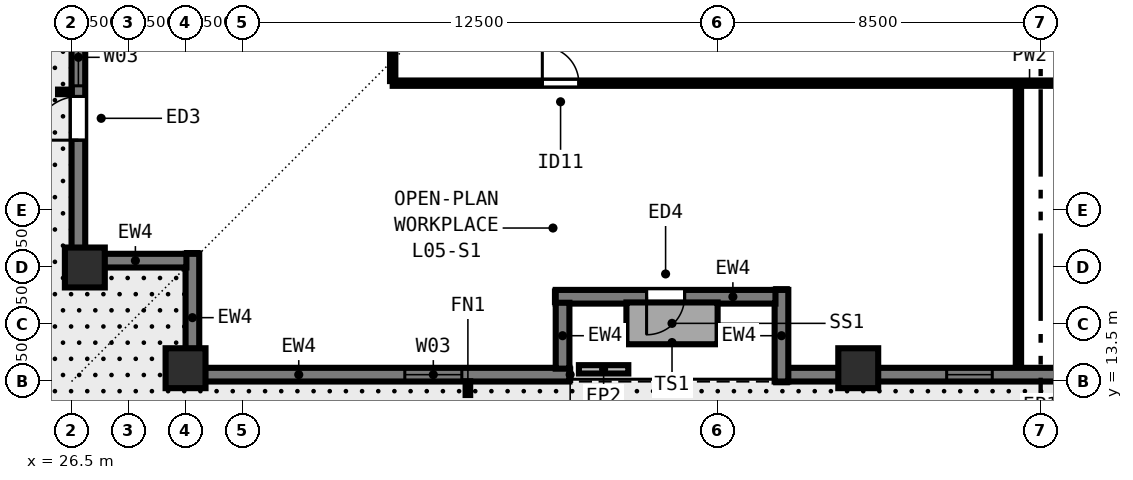
"""IFC4 building model, lengths in metres.
Left out: names, types, materials, properties, quantities, classifications, styles, units other than length and angle.
Written with IfcOpenShell. Run it as: python <this file> out.ifc"""

import sys

from ifc_helpers import new_model, si_unit, direction, frame, frame_2d, origin, origin_2d, place, context, subcontext, project, spatial, rectangle, extrude, element, fill, save


model = new_model("IFC4")
c1 = context("Model", 3, precision=1e-05, world=origin(), true_north=direction((0.0, 1.0)))
c2 = subcontext(c1, "Body", "Model", "MODEL_VIEW")
j1 = project(units=[si_unit("LENGTHUNIT", "METRE"), si_unit("PLANEANGLEUNIT", "RADIAN")], contexts=[c1])
p1 = place(None, origin())
s1 = spatial("IfcSite", under=j1, at=p1, CompositionType="ELEMENT")
p2 = place(p1, origin())
s2 = spatial("IfcBuilding", under=s1, at=p2, CompositionType="ELEMENT")
p3 = place(p2, frame((0.0, 0.0, 23.5)))
s3 = spatial("IfcBuildingStorey", under=s2, at=p3, CompositionType="ELEMENT", Elevation=23.5)
for number, where, z_axis, x_axis in (
    (1, (29.5, 13.85, 0.0), (0.0, 0.0, 1.0), (1.0, 0.0, 0.0)),
    (2, (47.2, 13.85, 0.0), (0.0, 0.0, 1.0), (1.0, 0.0, 0.0)),
    (3, (26.85, 16.5, 0.0), (0.0, 0.0, 1.0), (0.0, 1.0, 0.0)),
):
    element("IfcColumn", number, at=place(p3, frame(where, z_axis=z_axis, x_axis=x_axis)), inside=s3, PredefinedType="COLUMN", context=c2, shape_type="SweptSolid", body=[
        extrude(rectangle(XDim=1.05, YDim=1.05, at=origin_2d()), origin(), (0.0, 0.0, 1.0), 3.5),
    ])
p4 = place(p3, frame((39.6, 13.68, 0.0), z_axis=(0.0, 0.0, 1.0), x_axis=(-1.0, 0.0, 0.0)))
e4 = element("IfcWall", 4, at=p4, inside=s3, PredefinedType="SOLIDWALL", context=c2, shape_type="SweptSolid", body=[
    extrude(rectangle(XDim=9.762, YDim=0.36, at=frame_2d((4.881, 0.0))), origin(), (0.0, 0.0, 1.0), 3.28),
])
p5 = place(p4, frame((2.831, 0.0, 0.8)))
e5 = element("IfcOpeningElement", 5, at=p5, cuts=e4, PredefinedType="OPENING", context=c2, shape_type="SweptSolid", body=[
    extrude(rectangle(XDim=1.5, YDim=1.544, at=frame_2d((0.75, 0.772))), frame((0.0, 0.19, 0.0), z_axis=(0.0, -1.0, 0.0), x_axis=(1.0, 0.0, 0.0)), (0.0, 0.0, 1.0), 0.38),
])
p6 = place(p3, frame((29.68, 13.5, 0.0), z_axis=(0.0, 0.0, 1.0), x_axis=(0.0, 1.0, 0.0)))
e6 = element("IfcWall", 6, at=p6, inside=s3, PredefinedType="SOLIDWALL", context=c2, shape_type="SweptSolid", body=[
    extrude(rectangle(XDim=3.36, YDim=0.36, at=frame_2d((1.68, 0.0))), origin(), (0.0, 0.0, 1.0), 3.28),
])
p7 = place(p3, frame((29.522, 16.68, 0.0), z_axis=(0.0, 0.0, 1.0), x_axis=(-1.0, 0.0, 0.0)))
e7 = element("IfcWall", 7, at=p7, inside=s3, PredefinedType="SOLIDWALL", context=c2, shape_type="SweptSolid", body=[
    extrude(rectangle(XDim=2.684, YDim=0.36, at=frame_2d((1.342, 0.0))), origin(), (0.0, 0.0, 1.0), 3.28),
])
p8 = place(p3, frame((26.68, 16.5, 0.0), z_axis=(0.0, 0.0, 1.0), x_axis=(0.0, 1.0, 0.0)))
e8 = element("IfcWall", 8, at=p8, inside=s3, PredefinedType="SOLIDWALL", context=c2, shape_type="SweptSolid", body=[
    extrude(rectangle(XDim=44.662, YDim=0.36, at=frame_2d((22.331, 0.0))), origin(), (0.0, 0.0, 1.0), 3.28),
])
p9 = place(p8, frame((4.78, 0.0, 0.8)))
e9 = element("IfcOpeningElement", 9, at=p9, cuts=e8, PredefinedType="OPENING", context=c2, shape_type="SweptSolid", body=[
    extrude(rectangle(XDim=1.5, YDim=1.544, at=frame_2d((0.75, 0.772))), frame((0.0, 0.19, 0.0), z_axis=(0.0, -1.0, 0.0), x_axis=(1.0, 0.0, 0.0)), (0.0, 0.0, 1.0), 0.38),
])
p10 = place(p8, frame((8.29, 0.0, 0.8)))
e10 = element("IfcOpeningElement", 10, at=p10, cuts=e8, PredefinedType="OPENING", context=c2, shape_type="SweptSolid", body=[
    extrude(rectangle(XDim=1.2, YDim=1.544, at=frame_2d((0.6, 0.772))), frame((0.0, 0.19, 0.0), z_axis=(0.0, -1.0, 0.0), x_axis=(1.0, 0.0, 0.0)), (0.0, 0.0, 1.0), 0.38),
])
p11 = place(p8, frame((11.5, 0.0, 0.8)))
e11 = element("IfcOpeningElement", 11, at=p11, cuts=e8, PredefinedType="OPENING", context=c2, shape_type="SweptSolid", body=[
    extrude(rectangle(XDim=1.5, YDim=1.544, at=frame_2d((0.75, 0.772))), frame((0.0, 0.19, 0.0), z_axis=(0.0, -1.0, 0.0), x_axis=(1.0, 0.0, 0.0)), (0.0, 0.0, 1.0), 0.38),
])
p12 = place(p8, frame((14.561, 0.0, 0.8)))
e12 = element("IfcOpeningElement", 12, at=p12, cuts=e8, PredefinedType="OPENING", context=c2, shape_type="SweptSolid", body=[
    extrude(rectangle(XDim=1.2, YDim=1.544, at=frame_2d((0.6, 0.772))), frame((0.0, 0.19, 0.0), z_axis=(0.0, -1.0, 0.0), x_axis=(1.0, 0.0, 0.0)), (0.0, 0.0, 1.0), 0.38),
])
p13 = place(p8, frame((18.671, 0.0, 0.8)))
e13 = element("IfcOpeningElement", 13, at=p13, cuts=e8, PredefinedType="OPENING", context=c2, shape_type="SweptSolid", body=[
    extrude(rectangle(XDim=1.5, YDim=1.544, at=frame_2d((0.75, 0.772))), frame((0.0, 0.19, 0.0), z_axis=(0.0, -1.0, 0.0), x_axis=(1.0, 0.0, 0.0)), (0.0, 0.0, 1.0), 0.38),
])
p14 = place(p8, frame((21.731, 0.0, 0.8)))
e14 = element("IfcOpeningElement", 14, at=p14, cuts=e8, PredefinedType="OPENING", context=c2, shape_type="SweptSolid", body=[
    extrude(rectangle(XDim=1.2, YDim=1.544, at=frame_2d((0.6, 0.772))), frame((0.0, 0.19, 0.0), z_axis=(0.0, -1.0, 0.0), x_axis=(1.0, 0.0, 0.0)), (0.0, 0.0, 1.0), 0.38),
])
p15 = place(p8, frame((24.941, 0.0, 0.8)))
e15 = element("IfcOpeningElement", 15, at=p15, cuts=e8, PredefinedType="OPENING", context=c2, shape_type="SweptSolid", body=[
    extrude(rectangle(XDim=1.5, YDim=1.544, at=frame_2d((0.75, 0.772))), frame((0.0, 0.19, 0.0), z_axis=(0.0, -1.0, 0.0), x_axis=(1.0, 0.0, 0.0)), (0.0, 0.0, 1.0), 0.38),
])
p16 = place(p8, frame((29.302, 0.0, 0.8)))
e16 = element("IfcOpeningElement", 16, at=p16, cuts=e8, PredefinedType="OPENING", context=c2, shape_type="SweptSolid", body=[
    extrude(rectangle(XDim=1.2, YDim=1.544, at=frame_2d((0.6, 0.772))), frame((0.0, 0.19, 0.0), z_axis=(0.0, -1.0, 0.0), x_axis=(1.0, 0.0, 0.0)), (0.0, 0.0, 1.0), 0.38),
])
p17 = place(p8, frame((31.662, 0.0, 0.8)))
e17 = element("IfcOpeningElement", 17, at=p17, cuts=e8, PredefinedType="OPENING", context=c2, shape_type="SweptSolid", body=[
    extrude(rectangle(XDim=1.5, YDim=1.544, at=frame_2d((0.75, 0.772))), frame((0.0, 0.19, 0.0), z_axis=(0.0, -1.0, 0.0), x_axis=(1.0, 0.0, 0.0)), (0.0, 0.0, 1.0), 0.38),
])
p18 = place(p8, frame((35.172, 0.0, 0.8)))
e18 = element("IfcOpeningElement", 18, at=p18, cuts=e8, PredefinedType="OPENING", context=c2, shape_type="SweptSolid", body=[
    extrude(rectangle(XDim=1.2, YDim=1.544, at=frame_2d((0.6, 0.772))), frame((0.0, 0.19, 0.0), z_axis=(0.0, -1.0, 0.0), x_axis=(1.0, 0.0, 0.0)), (0.0, 0.0, 1.0), 0.38),
])
p19 = place(p8, frame((38.382, 0.0, 0.8)))
e19 = element("IfcOpeningElement", 19, at=p19, cuts=e8, PredefinedType="OPENING", context=c2, shape_type="SweptSolid", body=[
    extrude(rectangle(XDim=1.5, YDim=1.544, at=frame_2d((0.75, 0.772))), frame((0.0, 0.19, 0.0), z_axis=(0.0, -1.0, 0.0), x_axis=(1.0, 0.0, 0.0)), (0.0, 0.0, 1.0), 0.38),
])
p20 = place(p8, frame((3.35, 0.0, 0.0)))
e20 = element("IfcOpeningElement", 20, at=p20, cuts=e8, PredefinedType="OPENING", context=c2, shape_type="SweptSolid", body=[
    extrude(rectangle(XDim=1.15, YDim=2.15, at=frame_2d((0.575, 1.075))), frame((0.0, 0.19, 0.0), z_axis=(0.0, -1.0, 0.0), x_axis=(1.0, 0.0, 0.0)), (0.0, 0.0, 1.0), 0.38),
])
p21 = place(p3, frame((74.5, 13.68, 0.0), z_axis=(0.0, 0.0, 1.0), x_axis=(-1.0, 0.0, 0.0)))
e21 = element("IfcWall", 21, at=p21, inside=s3, PredefinedType="SOLIDWALL", context=c2, shape_type="SweptSolid", body=[
    extrude(rectangle(XDim=29.162, YDim=0.36, at=frame_2d((14.581, 0.0))), origin(), (0.0, 0.0, 1.0), 3.28),
])
p22 = place(p21, frame((4.888, 0.0, 0.8)))
e22 = element("IfcOpeningElement", 22, at=p22, cuts=e21, PredefinedType="OPENING", context=c2, shape_type="SweptSolid", body=[
    extrude(rectangle(XDim=1.5, YDim=1.544, at=frame_2d((0.75, 0.772))), frame((0.0, 0.19, 0.0), z_axis=(0.0, -1.0, 0.0), x_axis=(1.0, 0.0, 0.0)), (0.0, 0.0, 1.0), 0.38),
])
p23 = place(p21, frame((8.615, 0.0, 0.8)))
e23 = element("IfcOpeningElement", 23, at=p23, cuts=e21, PredefinedType="OPENING", context=c2, shape_type="SweptSolid", body=[
    extrude(rectangle(XDim=1.2, YDim=1.544, at=frame_2d((0.6, 0.772))), frame((0.0, 0.19, 0.0), z_axis=(0.0, -1.0, 0.0), x_axis=(1.0, 0.0, 0.0)), (0.0, 0.0, 1.0), 0.38),
])
p24 = place(p21, frame((12.042, 0.0, 0.8)))
e24 = element("IfcOpeningElement", 24, at=p24, cuts=e21, PredefinedType="OPENING", context=c2, shape_type="SweptSolid", body=[
    extrude(rectangle(XDim=1.5, YDim=1.544, at=frame_2d((0.75, 0.772))), frame((0.0, 0.19, 0.0), z_axis=(0.0, -1.0, 0.0), x_axis=(1.0, 0.0, 0.0)), (0.0, 0.0, 1.0), 0.38),
])
p25 = place(p21, frame((15.32, 0.0, 0.8)))
e25 = element("IfcOpeningElement", 25, at=p25, cuts=e21, PredefinedType="OPENING", context=c2, shape_type="SweptSolid", body=[
    extrude(rectangle(XDim=1.2, YDim=1.544, at=frame_2d((0.6, 0.772))), frame((0.0, 0.19, 0.0), z_axis=(0.0, -1.0, 0.0), x_axis=(1.0, 0.0, 0.0)), (0.0, 0.0, 1.0), 0.38),
])
p26 = place(p21, frame((19.197, 0.0, 0.8)))
e26 = element("IfcOpeningElement", 26, at=p26, cuts=e21, PredefinedType="OPENING", context=c2, shape_type="SweptSolid", body=[
    extrude(rectangle(XDim=1.5, YDim=1.544, at=frame_2d((0.75, 0.772))), frame((0.0, 0.19, 0.0), z_axis=(0.0, -1.0, 0.0), x_axis=(1.0, 0.0, 0.0)), (0.0, 0.0, 1.0), 0.38),
])
p27 = place(p21, frame((23.773, 0.0, 0.8)))
e27 = element("IfcOpeningElement", 27, at=p27, cuts=e21, PredefinedType="OPENING", context=c2, shape_type="SweptSolid", body=[
    extrude(rectangle(XDim=1.2, YDim=1.544, at=frame_2d((0.6, 0.772))), frame((0.0, 0.19, 0.0), z_axis=(0.0, -1.0, 0.0), x_axis=(1.0, 0.0, 0.0)), (0.0, 0.0, 1.0), 0.38),
])
p28 = place(p3, frame((45.18, 13.5, 0.0), z_axis=(0.0, 0.0, 1.0), x_axis=(0.0, 1.0, 0.0)))
e28 = element("IfcWall", 28, at=p28, inside=s3, PredefinedType="SOLIDWALL", context=c2, shape_type="SweptSolid", body=[
    extrude(rectangle(XDim=2.41, YDim=0.36, at=frame_2d((1.205, 0.0))), origin(), (0.0, 0.0, 1.0), 3.28),
])
p29 = place(p3, frame((45.022, 15.73, 0.0), z_axis=(0.0, 0.0, 1.0), x_axis=(-1.0, 0.0, 0.0)))
e29 = element("IfcWall", 29, at=p29, inside=s3, PredefinedType="SOLIDWALL", context=c2, shape_type="SweptSolid", body=[
    extrude(rectangle(XDim=5.782, YDim=0.36, at=frame_2d((2.891, 0.0))), origin(), (0.0, 0.0, 1.0), 3.28),
])
p30 = place(p29, frame((2.391, 0.0, 0.0)))
e30 = element("IfcOpeningElement", 30, at=p30, cuts=e29, PredefinedType="OPENING", context=c2, shape_type="SweptSolid", body=[
    extrude(rectangle(XDim=1.0, YDim=2.15, at=frame_2d((0.5, 1.075))), frame((0.0, 0.19, 0.0), z_axis=(0.0, -1.0, 0.0), x_axis=(1.0, 0.0, 0.0)), (0.0, 0.0, 1.0), 0.38),
])
p31 = place(p3, frame((39.42, 15.572, 0.0), z_axis=(0.0, 0.0, 1.0), x_axis=(0.0, -1.0, 0.0)))
e31 = element("IfcWall", 31, at=p31, inside=s3, PredefinedType="SOLIDWALL", context=c2, shape_type="SweptSolid", body=[
    extrude(rectangle(XDim=1.734, YDim=0.36, at=frame_2d((0.867, 0.0))), origin(), (0.0, 0.0, 1.0), 3.28),
])
p32 = place(p3, frame((39.85, 13.82, 0.0), z_axis=(0.0, 0.0, 1.0), x_axis=(1.0, 0.0, 0.0)))
e32 = element("IfcWall", 32, at=p32, inside=s3, PredefinedType="PARAPET", context=c2, shape_type="SweptSolid", body=[
    extrude(rectangle(XDim=1.3, YDim=0.22, at=frame_2d((0.65, 0.0))), origin(), (0.0, 0.0, 1.0), 0.55),
])
p33 = place(p3, frame((34.95, 21.35, 0.0), z_axis=(0.0, 0.0, 1.0), x_axis=(1.0, 0.0, 0.0)))
e33 = element("IfcWall", 33, at=p33, inside=s3, PredefinedType="PARTITIONING", context=c2, shape_type="SweptSolid", body=[
    extrude(rectangle(XDim=34.1, YDim=0.14, at=frame_2d((17.05, 0.0))), origin(), (0.0, 0.0, 1.0), 3.28),
])
p34 = place(p33, frame((3.938, 0.0, 0.0)))
e34 = element("IfcOpeningElement", 34, at=p34, cuts=e33, PredefinedType="OPENING", context=c2, shape_type="SweptSolid", body=[
    extrude(rectangle(XDim=0.96, YDim=2.12, at=frame_2d((0.48, 1.06))), frame((0.0, 0.08, 0.0), z_axis=(0.0, -1.0, 0.0), x_axis=(1.0, 0.0, 0.0)), (0.0, 0.0, 1.0), 0.16),
])
p35 = place(p33, frame((28.617, 0.0, 0.0)))
e35 = element("IfcOpeningElement", 35, at=p35, cuts=e33, PredefinedType="OPENING", context=c2, shape_type="SweptSolid", body=[
    extrude(rectangle(XDim=0.96, YDim=2.12, at=frame_2d((0.48, 1.06))), frame((0.0, 0.08, 0.0), z_axis=(0.0, -1.0, 0.0), x_axis=(1.0, 0.0, 0.0)), (0.0, 0.0, 1.0), 0.16),
])
p36 = place(p3, frame((34.95, 21.405, 0.0), z_axis=(0.0, 0.0, 1.0), x_axis=(0.0, 1.0, 0.0)))
e36 = element("IfcWall", 36, at=p36, inside=s3, PredefinedType="PARTITIONING", context=c2, shape_type="SweptSolid", body=[
    extrude(rectangle(XDim=35.19, YDim=0.14, at=frame_2d((17.595, 0.0))), origin(), (0.0, 0.0, 1.0), 3.28),
])
p37 = place(p36, frame((5.21, 0.0, 0.0)))
e37 = element("IfcOpeningElement", 37, at=p37, cuts=e36, PredefinedType="OPENING", context=c2, shape_type="SweptSolid", body=[
    extrude(rectangle(XDim=0.96, YDim=2.12, at=frame_2d((0.48, 1.06))), frame((0.0, 0.08, 0.0), z_axis=(0.0, -1.0, 0.0), x_axis=(1.0, 0.0, 0.0)), (0.0, 0.0, 1.0), 0.16),
])
p38 = place(p36, frame((17.052, 0.0, 0.0)))
e38 = element("IfcOpeningElement", 38, at=p38, cuts=e36, PredefinedType="OPENING", context=c2, shape_type="SweptSolid", body=[
    extrude(rectangle(XDim=0.96, YDim=2.12, at=frame_2d((0.48, 1.06))), frame((0.0, 0.08, 0.0), z_axis=(0.0, -1.0, 0.0), x_axis=(1.0, 0.0, 0.0)), (0.0, 0.0, 1.0), 0.16),
])
p39 = place(p36, frame((28.957, 0.0, 0.0)))
e39 = element("IfcOpeningElement", 39, at=p39, cuts=e36, PredefinedType="OPENING", context=c2, shape_type="SweptSolid", body=[
    extrude(rectangle(XDim=0.96, YDim=2.12, at=frame_2d((0.48, 1.06))), frame((0.0, 0.08, 0.0), z_axis=(0.0, -1.0, 0.0), x_axis=(1.0, 0.0, 0.0)), (0.0, 0.0, 1.0), 0.16),
])
p40 = place(p3, frame((51.415, 13.92, 0.0), z_axis=(0.0, 0.0, 1.0), x_axis=(0.0, 1.0, 0.0)))
e40 = element("IfcWall", 40, at=p40, inside=s3, PredefinedType="PARTITIONING", context=c2, shape_type="SweptSolid", body=[
    extrude(rectangle(XDim=7.33, YDim=0.14, at=frame_2d((3.665, 0.0))), origin(), (0.0, 0.0, 1.0), 2.849),
])
p41 = place(p5, origin())
e41 = element("IfcWindow", 41, at=p41, inside=s3, PartitioningType="SINGLE_PANEL", PredefinedType="WINDOW", context=c2, shape_type="SweptSolid", body=[
    extrude(rectangle(XDim=1.5, YDim=1.544, at=frame_2d((0.75, 0.772))), frame((0.0, -0.05, 0.0), z_axis=(0.0, -1.0, 0.0), x_axis=(1.0, 0.0, 0.0)), (0.0, 0.0, 1.0), 0.06),
])
fill(e5, e41)
p42 = place(p9, origin())
e42 = element("IfcWindow", 42, at=p42, inside=s3, PartitioningType="SINGLE_PANEL", PredefinedType="WINDOW", context=c2, shape_type="SweptSolid", body=[
    extrude(rectangle(XDim=1.5, YDim=1.544, at=frame_2d((0.75, 0.772))), frame((0.0, -0.05, 0.0), z_axis=(0.0, -1.0, 0.0), x_axis=(1.0, 0.0, 0.0)), (0.0, 0.0, 1.0), 0.06),
])
fill(e9, e42)
p43 = place(p27, origin())
e43 = element("IfcWindow", 43, at=p43, inside=s3, PartitioningType="SINGLE_PANEL", PredefinedType="WINDOW", context=c2, shape_type="SweptSolid", body=[
    extrude(rectangle(XDim=1.2, YDim=1.544, at=frame_2d((0.6, 0.772))), frame((0.0, -0.05, 0.0), z_axis=(0.0, -1.0, 0.0), x_axis=(1.0, 0.0, 0.0)), (0.0, 0.0, 1.0), 0.06),
])
fill(e27, e43)
p44 = place(p30, origin())
e44 = element("IfcDoor", 44, at=p44, inside=s3, OperationType="SINGLE_SWING_RIGHT", PredefinedType="DOOR", context=c2, shape_type="SweptSolid", body=[
    extrude(rectangle(XDim=1.0, YDim=2.15, at=frame_2d((0.5, 1.075))), frame((0.0, 0.025, 0.0), z_axis=(0.0, -1.0, 0.0), x_axis=(1.0, 0.0, 0.0)), (0.0, 0.0, 1.0), 0.05),
])
fill(e30, e44)
p45 = place(p20, origin())
e45 = element("IfcDoor", 45, at=p45, inside=s3, OperationType="SINGLE_SWING_LEFT", PredefinedType="DOOR", context=c2, shape_type="SweptSolid", body=[
    extrude(rectangle(XDim=1.15, YDim=2.15, at=frame_2d((0.575, 1.075))), frame((0.0, 0.025, 0.0), z_axis=(0.0, -1.0, 0.0), x_axis=(1.0, 0.0, 0.0)), (0.0, 0.0, 1.0), 0.05),
])
fill(e20, e45)
p46 = place(p34, origin())
e46 = element("IfcDoor", 46, at=p46, inside=s3, OperationType="SINGLE_SWING_LEFT", PredefinedType="DOOR", context=c2, shape_type="SweptSolid", body=[
    extrude(rectangle(XDim=0.96, YDim=2.12, at=frame_2d((0.48, 1.06))), frame((0.0, 0.025, 0.0), z_axis=(0.0, -1.0, 0.0), x_axis=(1.0, 0.0, 0.0)), (0.0, 0.0, 1.0), 0.05),
])
fill(e34, e46)
save(model, sys.argv[1])
